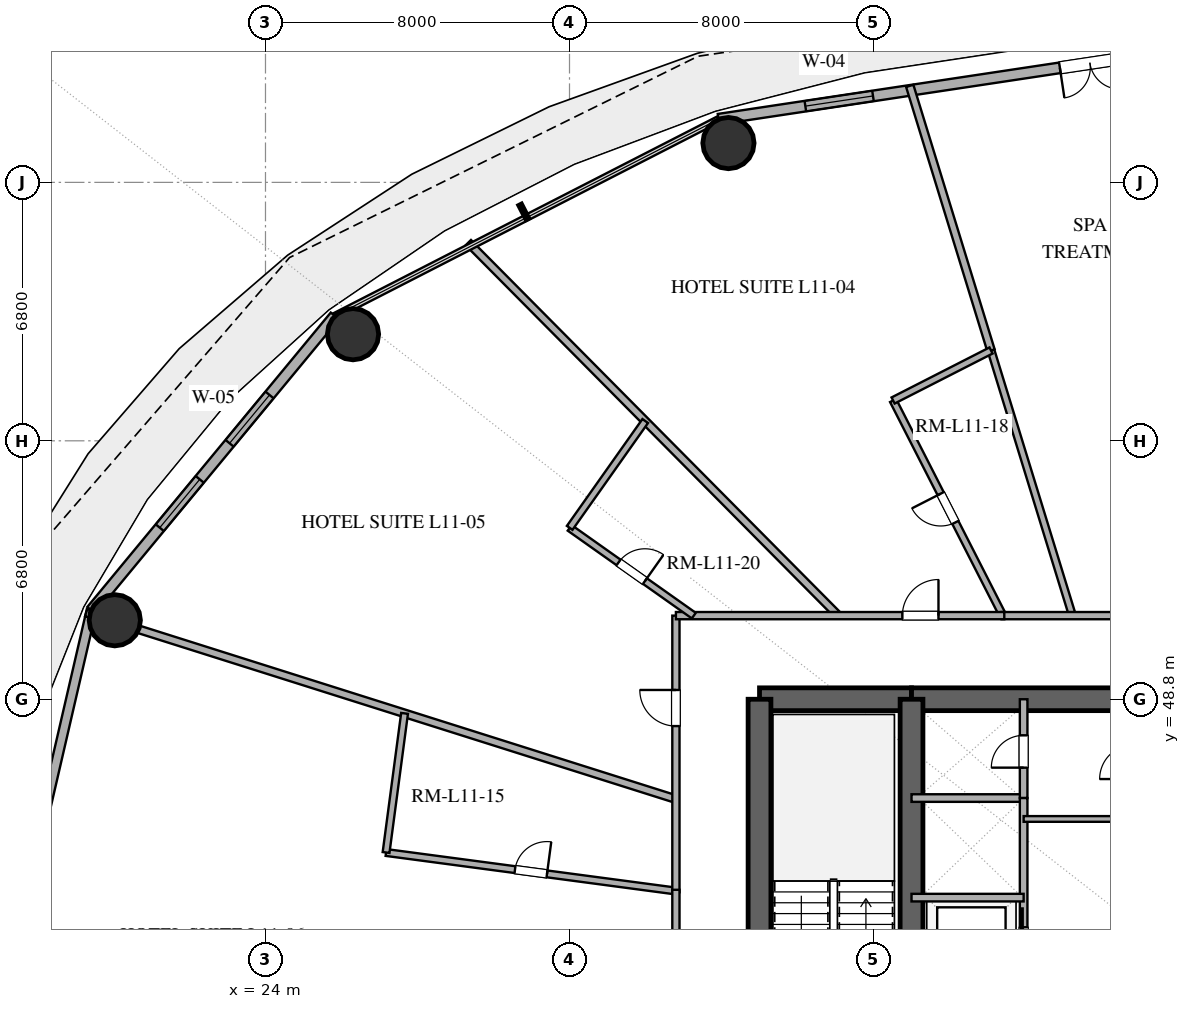
"""IFC4 building model, lengths in metres.
Left out: names, types, materials, properties, quantities, classifications, styles, units other than length and angle.
Written with IfcOpenShell. Run it as: python <this file> out.ifc"""

import sys

from ifc_helpers import new_model, si_unit, direction, frame, frame_2d, origin, origin_2d, place, context, subcontext, project, spatial, rectangle, hollow_circle, extrude, element, fill, save


model = new_model("IFC4")
c1 = context("Model", 3, precision=1e-05, world=origin(), true_north=direction((0.0, 1.0)))
c2 = subcontext(c1, "Body", "Model", "MODEL_VIEW")
j1 = project(units=[si_unit("LENGTHUNIT", "METRE"), si_unit("PLANEANGLEUNIT", "RADIAN")], contexts=[c1])
p1 = place(None, origin())
s1 = spatial("IfcSite", under=j1, at=p1, CompositionType="ELEMENT")
p2 = place(p1, origin())
s2 = spatial("IfcBuilding", under=s1, at=p2, CompositionType="ELEMENT")
p3 = place(p2, frame((0.0, 0.0, 49.8)))
s3 = spatial("IfcBuildingStorey", under=s2, at=p3, CompositionType="ELEMENT", Elevation=49.8)
p4 = place(p3, frame((37.0, 48.8, 0.0), z_axis=(0.0, 0.0, 1.0), x_axis=(1.0, 0.0, 0.0)))
e1 = element("IfcWall", 1, at=p4, inside=s3, PredefinedType="SHEAR", context=c2, shape_type="SweptSolid", body=[
    extrude(rectangle(XDim=4.0, YDim=0.6, at=frame_2d((2.0, 0.0))), origin(), (0.0, 0.0, 1.0), 3.38),
])
p5 = place(p3, frame((41.0, 48.8, 0.0), z_axis=(0.0, 0.0, 1.0), x_axis=(1.0, 0.0, 0.0)))
e2 = element("IfcWall", 2, at=p5, inside=s3, PredefinedType="SHEAR", context=c2, shape_type="SweptSolid", body=[
    extrude(rectangle(XDim=14.0, YDim=0.6, at=frame_2d((7.0, 0.0))), origin(), (0.0, 0.0, 1.0), 3.38),
])
p6 = place(p5, frame((6.1, 0.0, 0.0)))
e3 = element("IfcOpeningElement", 3, at=p6, cuts=e2, PredefinedType="OPENING", context=c2, shape_type="SweptSolid", body=[
    extrude(rectangle(XDim=1.8, YDim=2.25, at=frame_2d((0.9, 1.125))), frame((0.0, 0.31, 0.0), z_axis=(0.0, -1.0, 0.0), x_axis=(1.0, 0.0, 0.0)), (0.0, 0.0, 1.0), 0.62),
])
p7 = place(p3, frame((37.0, 35.2, 0.0), z_axis=(0.0, 0.0, 1.0), x_axis=(0.0, 1.0, 0.0)))
e4 = element("IfcWall", 4, at=p7, inside=s3, PredefinedType="SHEAR", context=c2, shape_type="SweptSolid", body=[
    extrude(rectangle(XDim=13.6, YDim=0.6, at=frame_2d((6.8, 0.0))), origin(), (0.0, 0.0, 1.0), 3.38),
])
p8 = place(p7, frame((1.5, 0.0, 0.0)))
e5 = element("IfcOpeningElement", 5, at=p8, cuts=e4, PredefinedType="OPENING", context=c2, shape_type="SweptSolid", body=[
    extrude(rectangle(XDim=1.2, YDim=2.15, at=frame_2d((0.6, 1.075))), frame((0.0, 0.31, 0.0), z_axis=(0.0, -1.0, 0.0), x_axis=(1.0, 0.0, 0.0)), (0.0, 0.0, 1.0), 0.62),
])
p9 = place(p3, frame((41.0, 35.2, 0.0), z_axis=(0.0, 0.0, 1.0), x_axis=(0.0, 1.0, 0.0)))
e6 = element("IfcWall", 6, at=p9, inside=s3, PredefinedType="SHEAR", context=c2, shape_type="SweptSolid", body=[
    extrude(rectangle(XDim=13.6, YDim=0.6, at=frame_2d((6.8, 0.0))), origin(), (0.0, 0.0, 1.0), 3.38),
])
p10 = place(p9, frame((1.15, 0.0, 0.0)))
e7 = element("IfcOpeningElement", 7, at=p10, cuts=e6, PredefinedType="OPENING", context=c2, shape_type="SweptSolid", body=[
    extrude(rectangle(XDim=1.1, YDim=2.2, at=frame_2d((0.55, 1.1))), frame((0.0, 0.31, 0.0), z_axis=(0.0, -1.0, 0.0), x_axis=(1.0, 0.0, 0.0)), (0.0, 0.0, 1.0), 0.62),
])
for number, where, z_axis, x_axis in (
    (8, (36.182, 63.434, 0.0), (0.0, 0.0, 1.0), (1.0, 0.0, 0.0)),
    (9, (26.303, 58.405, 0.0), (0.0, 0.0, 1.0), (1.0, 0.0, 0.0)),
    (10, (20.034, 50.878, 0.0), (0.0, 0.0, 1.0), (1.0, 0.0, 0.0)),
):
    element("IfcColumn", number, at=place(p3, frame(where, z_axis=z_axis, x_axis=x_axis)), inside=s3, PredefinedType="COLUMN", context=c2, shape_type="SweptSolid", body=[
        extrude(hollow_circle(Radius=0.675, WallThickness=0.036, at=origin_2d()), origin(), (0.0, 0.0, 1.0), 3.38),
    ])
p11 = place(p3, frame((48.0, 65.88, 0.0), z_axis=(0.0, 0.0, 1.0), x_axis=(-0.988864835849, -0.148816452121, 0.0)))
e11 = element("IfcWall", 11, at=p11, inside=s3, PredefinedType="SOLIDWALL", context=c2, shape_type="SweptSolid", body=[
    extrude(rectangle(XDim=12.214, YDim=0.28, at=frame_2d((6.107, 0.0))), origin(), (0.0, 0.0, 1.0), 3.38),
])
p12 = place(p11, frame((1.531, 0.0, 0.0)))
e12 = element("IfcOpeningElement", 12, at=p12, cuts=e11, PredefinedType="OPENING", context=c2, shape_type="SweptSolid", body=[
    extrude(rectangle(XDim=1.6, YDim=2.25, at=frame_2d((0.8, 1.125))), frame((0.0, 0.15, 0.0), z_axis=(0.0, -1.0, 0.0), x_axis=(1.0, 0.0, 0.0)), (0.0, 0.0, 1.0), 0.3),
])
p13 = place(p11, frame((8.104, 0.0, 0.85)))
e13 = element("IfcOpeningElement", 13, at=p13, cuts=e11, PredefinedType="OPENING", context=c2, shape_type="SweptSolid", body=[
    extrude(rectangle(XDim=1.8, YDim=2.2, at=frame_2d((0.9, 1.1))), frame((0.0, 0.15, 0.0), z_axis=(0.0, -1.0, 0.0), x_axis=(1.0, 0.0, 0.0)), (0.0, 0.0, 1.0), 0.3),
])
p14 = place(p3, frame((25.826, 58.886, 0.0), z_axis=(0.0, 0.0, 1.0), x_axis=(-0.637296809613, -0.770618437657, 0.0)))
e14 = element("IfcWall", 14, at=p14, inside=s3, PredefinedType="SOLIDWALL", context=c2, shape_type="SweptSolid", body=[
    extrude(rectangle(XDim=10.053, YDim=0.28, at=frame_2d((5.027, 0.0))), origin(), (0.0, 0.0, 1.0), 3.38),
])
p15 = place(p14, frame((2.698, 0.0, 0.85)))
e15 = element("IfcOpeningElement", 15, at=p15, cuts=e14, PredefinedType="OPENING", context=c2, shape_type="SweptSolid", body=[
    extrude(rectangle(XDim=1.65, YDim=2.0, at=frame_2d((0.825, 1.0))), frame((0.0, 0.15, 0.0), z_axis=(0.0, -1.0, 0.0), x_axis=(1.0, 0.0, 0.0)), (0.0, 0.0, 1.0), 0.3),
])
p16 = place(p14, frame((5.58, 0.0, 0.85)))
e16 = element("IfcOpeningElement", 16, at=p16, cuts=e14, PredefinedType="OPENING", context=c2, shape_type="SweptSolid", body=[
    extrude(rectangle(XDim=1.65, YDim=2.0, at=frame_2d((0.825, 1.0))), frame((0.0, 0.15, 0.0), z_axis=(0.0, -1.0, 0.0), x_axis=(1.0, 0.0, 0.0)), (0.0, 0.0, 1.0), 0.3),
])
p17 = place(p3, frame((19.419, 51.138, 0.0), z_axis=(0.0, 0.0, 1.0), x_axis=(-0.225454452941, -0.974253709076, 0.0)))
e17 = element("IfcWall", 17, at=p17, inside=s3, PredefinedType="SOLIDWALL", context=c2, shape_type="SweptSolid", body=[
    extrude(rectangle(XDim=9.38, YDim=0.25, at=frame_2d((4.69, 0.0))), origin(), (0.0, 0.0, 1.0), 3.38),
])
p18 = place(p3, frame((41.0, 46.2, 0.0), z_axis=(0.0, 0.0, 1.0), x_axis=(1.0, 0.0, 0.0)))
e18 = element("IfcWall", 18, at=p18, inside=s3, PredefinedType="SOLIDWALL", context=c2, shape_type="SweptSolid", body=[
    extrude(rectangle(XDim=2.95, YDim=0.2, at=frame_2d((1.475, 0.0))), origin(), (0.0, 0.0, 1.0), 2.74),
])
p19 = place(p3, frame((43.95, 46.2, 0.0), z_axis=(0.0, 0.0, 1.0), x_axis=(0.0, 1.0, 0.0)))
e19 = element("IfcWall", 19, at=p19, inside=s3, PredefinedType="SOLIDWALL", context=c2, shape_type="SweptSolid", body=[
    extrude(rectangle(XDim=2.6, YDim=0.2, at=frame_2d((1.3, 0.0))), origin(), (0.0, 0.0, 1.0), 2.74),
])
p20 = place(p19, frame((0.8, 0.0, 0.0)))
e20 = element("IfcOpeningElement", 20, at=p20, cuts=e19, PredefinedType="OPENING", context=c2, shape_type="SweptSolid", body=[
    extrude(rectangle(XDim=0.85, YDim=2.15, at=frame_2d((0.425, 1.075))), frame((0.0, 0.11, 0.0), z_axis=(0.0, -1.0, 0.0), x_axis=(1.0, 0.0, 0.0)), (0.0, 0.0, 1.0), 0.22),
])
p21 = place(p3, frame((43.95, 38.4, 0.0), z_axis=(0.0, 0.0, 1.0), x_axis=(0.0, 1.0, 0.0)))
e21 = element("IfcWall", 21, at=p21, inside=s3, PredefinedType="SOLIDWALL", context=c2, shape_type="SweptSolid", body=[
    extrude(rectangle(XDim=7.8, YDim=0.2, at=frame_2d((3.9, 0.0))), origin(), (0.0, 0.0, 1.0), 2.74),
])
p22 = place(p21, frame((0.7, 0.0, 0.0)))
e22 = element("IfcOpeningElement", 22, at=p22, cuts=e21, PredefinedType="OPENING", context=c2, shape_type="SweptSolid", body=[
    extrude(rectangle(XDim=1.1, YDim=2.2, at=frame_2d((0.55, 1.1))), frame((0.0, 0.11, 0.0), z_axis=(0.0, -1.0, 0.0), x_axis=(1.0, 0.0, 0.0)), (0.0, 0.0, 1.0), 0.22),
])
p23 = place(p21, frame((3.3, 0.0, 0.0)))
e23 = element("IfcOpeningElement", 23, at=p23, cuts=e21, PredefinedType="OPENING", context=c2, shape_type="SweptSolid", body=[
    extrude(rectangle(XDim=1.1, YDim=2.2, at=frame_2d((0.55, 1.1))), frame((0.0, 0.11, 0.0), z_axis=(0.0, -1.0, 0.0), x_axis=(1.0, 0.0, 0.0)), (0.0, 0.0, 1.0), 0.22),
])
p24 = place(p3, frame((41.0, 43.58, 0.0), z_axis=(0.0, 0.0, 1.0), x_axis=(1.0, 0.0, 0.0)))
e24 = element("IfcWall", 24, at=p24, inside=s3, PredefinedType="SOLIDWALL", context=c2, shape_type="SweptSolid", body=[
    extrude(rectangle(XDim=2.95, YDim=0.2, at=frame_2d((1.475, 0.0))), origin(), (0.0, 0.0, 1.0), 2.74),
])
p25 = place(p3, frame((43.95, 45.65, 0.0), z_axis=(0.0, 0.0, 1.0), x_axis=(1.0, 0.0, 0.0)))
e25 = element("IfcWall", 25, at=p25, inside=s3, PredefinedType="PARTITIONING", context=c2, shape_type="SweptSolid", body=[
    extrude(rectangle(XDim=2.9, YDim=0.15, at=frame_2d((1.45, 0.0))), origin(), (0.0, 0.0, 1.0), 2.74),
])
p26 = place(p3, frame((34.8, 46.172, 0.0), z_axis=(0.0, 0.0, 1.0), x_axis=(-0.953511676516, 0.301356073023, 0.0)))
e26 = element("IfcWall", 26, at=p26, inside=s3, PredefinedType="PARTITIONING", context=c2, shape_type="SweptSolid", body=[
    extrude(rectangle(XDim=16.275, YDim=0.2, at=frame_2d((8.137, 0.0))), origin(), (0.0, 0.0, 1.0), 2.74),
])
p27 = place(p3, frame((27.173, 44.768, 0.0), z_axis=(0.0, 0.0, 1.0), x_axis=(0.991283239225, -0.131748015661, 0.0)))
e27 = element("IfcWall", 27, at=p27, inside=s3, PredefinedType="PLUMBINGWALL", context=c2, shape_type="SweptSolid", body=[
    extrude(rectangle(XDim=7.694, YDim=0.18, at=frame_2d((3.847, 0.0))), origin(), (0.0, 0.0, 1.0), 2.74),
])
p28 = place(p27, frame((3.422, 0.0, 0.0)))
e28 = element("IfcOpeningElement", 28, at=p28, cuts=e27, PredefinedType="OPENING", context=c2, shape_type="SweptSolid", body=[
    extrude(rectangle(XDim=0.85, YDim=2.1, at=frame_2d((0.425, 1.05))), frame((0.0, 0.1, 0.0), z_axis=(0.0, -1.0, 0.0), x_axis=(1.0, 0.0, 0.0)), (0.0, 0.0, 1.0), 0.2),
])
p29 = place(p3, frame((43.092, 57.976, 0.0), z_axis=(0.0, 0.0, 1.0), x_axis=(0.293648581073, -0.95591344317, 0.0)))
e29 = element("IfcWall", 29, at=p29, inside=s3, PredefinedType="PLUMBINGWALL", context=c2, shape_type="SweptSolid", body=[
    extrude(rectangle(XDim=7.298, YDim=0.18, at=frame_2d((3.649, 0.0))), origin(), (0.0, 0.0, 1.0), 2.74),
])
p30 = place(p3, frame((40.953, 64.939, 0.0), z_axis=(0.0, 0.0, 1.0), x_axis=(0.293635973675, -0.955917315966, 0.0)))
e30 = element("IfcWall", 30, at=p30, inside=s3, PredefinedType="PARTITIONING", context=c2, shape_type="SweptSolid", body=[
    extrude(rectangle(XDim=7.284, YDim=0.2, at=frame_2d((3.642, 0.0))), origin(), (0.0, 0.0, 1.0), 2.74),
])
p31 = place(p3, frame((39.072, 51.0, 0.0), z_axis=(0.0, 0.0, 1.0), x_axis=(-0.704257683765, 0.70994444491, 0.0)))
e31 = element("IfcWall", 31, at=p31, inside=s3, PredefinedType="PARTITIONING", context=c2, shape_type="SweptSolid", body=[
    extrude(rectangle(XDim=13.824, YDim=0.2, at=frame_2d((6.912, 0.0))), origin(), (0.0, 0.0, 1.0), 2.74),
])
p32 = place(p3, frame((43.405, 51.0, 0.0), z_axis=(0.0, 0.0, 1.0), x_axis=(-0.454680565764, 0.890654581259, 0.0)))
e32 = element("IfcWall", 32, at=p32, inside=s3, PredefinedType="PLUMBINGWALL", context=c2, shape_type="SweptSolid", body=[
    extrude(rectangle(XDim=6.356, YDim=0.18, at=frame_2d((3.178, 0.0))), origin(), (0.0, 0.0, 1.0), 2.74),
])
p33 = place(p32, frame((2.753, 0.0, 0.0)))
e33 = element("IfcOpeningElement", 33, at=p33, cuts=e32, PredefinedType="OPENING", context=c2, shape_type="SweptSolid", body=[
    extrude(rectangle(XDim=0.85, YDim=2.1, at=frame_2d((0.425, 1.05))), frame((0.0, 0.1, 0.0), z_axis=(0.0, -1.0, 0.0), x_axis=(1.0, 0.0, 0.0)), (0.0, 0.0, 1.0), 0.2),
])
p34 = place(p3, frame((43.369, 51.0, 0.0), z_axis=(0.0, 0.0, 1.0), x_axis=(1.0, 0.0, 0.0)))
e34 = element("IfcWall", 34, at=p34, inside=s3, PredefinedType="PARTITIONING", context=c2, shape_type="SweptSolid", body=[
    extrude(rectangle(XDim=17.831, YDim=0.19, at=frame_2d((8.916, 0.0))), origin(), (0.0, 0.0, 1.0), 2.74),
])
p35 = place(p34, frame((14.29, 0.0, 0.0)))
e35 = element("IfcOpeningElement", 35, at=p35, cuts=e34, PredefinedType="OPENING", context=c2, shape_type="SweptSolid", body=[
    extrude(rectangle(XDim=0.95, YDim=2.15, at=frame_2d((0.475, 1.075))), frame((0.0, 0.105, 0.0), z_axis=(0.0, -1.0, 0.0), x_axis=(1.0, 0.0, 0.0)), (0.0, 0.0, 1.0), 0.21),
])
p36 = place(p34, frame((8.533, 0.0, 0.0)))
e36 = element("IfcOpeningElement", 36, at=p36, cuts=e34, PredefinedType="OPENING", context=c2, shape_type="SweptSolid", body=[
    extrude(rectangle(XDim=1.0, YDim=2.2, at=frame_2d((0.5, 1.1))), frame((0.0, 0.105, 0.0), z_axis=(0.0, -1.0, 0.0), x_axis=(1.0, 0.0, 0.0)), (0.0, 0.0, 1.0), 0.21),
])
p37 = place(p34, frame((3.591, 0.0, 0.0)))
e37 = element("IfcOpeningElement", 37, at=p37, cuts=e34, PredefinedType="OPENING", context=c2, shape_type="SweptSolid", body=[
    extrude(rectangle(XDim=1.0, YDim=2.2, at=frame_2d((0.5, 1.1))), frame((0.0, 0.105, 0.0), z_axis=(0.0, -1.0, 0.0), x_axis=(1.0, 0.0, 0.0)), (0.0, 0.0, 1.0), 0.21),
])
p38 = place(p3, frame((34.8, 43.722, 0.0), z_axis=(0.0, 0.0, 1.0), x_axis=(0.0, 1.0, 0.0)))
e38 = element("IfcWall", 38, at=p38, inside=s3, PredefinedType="PARTITIONING", context=c2, shape_type="SweptSolid", body=[
    extrude(rectangle(XDim=7.278, YDim=0.19, at=frame_2d((3.639, 0.0))), origin(), (0.0, 0.0, 1.0), 2.74),
])
p39 = place(p38, frame((4.372, 0.0, 0.0)))
e39 = element("IfcOpeningElement", 39, at=p39, cuts=e38, PredefinedType="OPENING", context=c2, shape_type="SweptSolid", body=[
    extrude(rectangle(XDim=0.95, YDim=2.15, at=frame_2d((0.475, 1.075))), frame((0.0, 0.105, 0.0), z_axis=(0.0, -1.0, 0.0), x_axis=(1.0, 0.0, 0.0)), (0.0, 0.0, 1.0), 0.21),
])
p40 = place(p3, frame((34.8, 51.0, 0.0), z_axis=(0.0, 0.0, 1.0), x_axis=(1.0, 0.0, 0.0)))
e40 = element("IfcWall", 40, at=p40, inside=s3, PredefinedType="PARTITIONING", context=c2, shape_type="SweptSolid", body=[
    extrude(rectangle(XDim=8.641, YDim=0.19, at=frame_2d((4.32, 0.0))), origin(), (0.0, 0.0, 1.0), 2.74),
])
p41 = place(p40, frame((5.959, 0.0, 0.0)))
e41 = element("IfcOpeningElement", 41, at=p41, cuts=e40, PredefinedType="OPENING", context=c2, shape_type="SweptSolid", body=[
    extrude(rectangle(XDim=0.95, YDim=2.15, at=frame_2d((0.475, 1.075))), frame((0.0, 0.105, 0.0), z_axis=(0.0, -1.0, 0.0), x_axis=(1.0, 0.0, 0.0)), (0.0, 0.0, 1.0), 0.21),
])
p42 = place(p3, frame((34.8, 39.604, 0.0), z_axis=(0.0, 0.0, 1.0), x_axis=(0.0, 1.0, 0.0)))
e42 = element("IfcWall", 42, at=p42, inside=s3, PredefinedType="PARTITIONING", context=c2, shape_type="SweptSolid", body=[
    extrude(rectangle(XDim=4.183, YDim=0.19, at=frame_2d((2.091, 0.0))), origin(), (0.0, 0.0, 1.0), 2.74),
])
p43 = place(p42, frame((1.616, 0.0, 0.0)))
e43 = element("IfcOpeningElement", 43, at=p43, cuts=e42, PredefinedType="OPENING", context=c2, shape_type="SweptSolid", body=[
    extrude(rectangle(XDim=0.95, YDim=2.15, at=frame_2d((0.475, 1.075))), frame((0.0, 0.105, 0.0), z_axis=(0.0, -1.0, 0.0), x_axis=(1.0, 0.0, 0.0)), (0.0, 0.0, 1.0), 0.21),
])
p44 = place(p3, frame((32.005, 53.309, 0.0), z_axis=(0.0, 0.0, 1.0), x_axis=(0.816524416543, -0.577310901672, 0.0)))
e44 = element("IfcWall", 44, at=p44, inside=s3, PredefinedType="PLUMBINGWALL", context=c2, shape_type="SweptSolid", body=[
    extrude(rectangle(XDim=4.0, YDim=0.18, at=frame_2d((2.0, 0.0))), origin(), (0.0, 0.0, 1.0), 2.74),
])
p45 = place(p44, frame((1.575, 0.0, 0.0)))
e45 = element("IfcOpeningElement", 45, at=p45, cuts=e44, PredefinedType="OPENING", context=c2, shape_type="SweptSolid", body=[
    extrude(rectangle(XDim=0.85, YDim=2.1, at=frame_2d((0.425, 1.05))), frame((0.0, 0.1, 0.0), z_axis=(0.0, -1.0, 0.0), x_axis=(1.0, 0.0, 0.0)), (0.0, 0.0, 1.0), 0.2),
])
p46 = place(p3, frame((27.66, 48.428, 0.0), z_axis=(0.0, 0.0, 1.0), x_axis=(-0.131760975246, -0.991281516726, 0.0)))
e46 = element("IfcWall", 46, at=p46, inside=s3, PredefinedType="PLUMBINGWALL", context=c2, shape_type="SweptSolid", body=[
    extrude(rectangle(XDim=3.693, YDim=0.18, at=frame_2d((1.846, 0.0))), origin(), (0.0, 0.0, 1.0), 2.74),
])
p47 = place(p3, frame((33.993, 56.121, 0.0), z_axis=(0.0, 0.0, 1.0), x_axis=(-0.57730102799, -0.816531397487, 0.0)))
e47 = element("IfcWall", 47, at=p47, inside=s3, PredefinedType="PLUMBINGWALL", context=c2, shape_type="SweptSolid", body=[
    extrude(rectangle(XDim=3.443, YDim=0.18, at=frame_2d((1.722, 0.0))), origin(), (0.0, 0.0, 1.0), 2.74),
])
p48 = place(p3, frame((40.515, 56.661, 0.0), z_axis=(0.0, 0.0, 1.0), x_axis=(0.890666340124, 0.454657531083, 0.0)))
e48 = element("IfcWall", 48, at=p48, inside=s3, PredefinedType="PLUMBINGWALL", context=c2, shape_type="SweptSolid", body=[
    extrude(rectangle(XDim=2.893, YDim=0.18, at=frame_2d((1.447, 0.0))), origin(), (0.0, 0.0, 1.0), 2.74),
])
p49 = place(p12, origin())
e49 = element("IfcDoor", 49, at=p49, inside=s3, OperationType="DOUBLE_DOOR_SINGLE_SWING", PredefinedType="DOOR", context=c2, shape_type="SweptSolid", body=[
    extrude(rectangle(XDim=1.6, YDim=2.25, at=frame_2d((0.8, 1.125))), frame((0.0, 0.025, 0.0), z_axis=(0.0, -1.0, 0.0), x_axis=(1.0, 0.0, 0.0)), (0.0, 0.0, 1.0), 0.05),
])
fill(e12, e49)
p50 = place(p13, origin())
e50 = element("IfcWindow", 50, at=p50, inside=s3, PartitioningType="SINGLE_PANEL", PredefinedType="WINDOW", context=c2, shape_type="SweptSolid", body=[
    extrude(rectangle(XDim=1.8, YDim=2.2, at=frame_2d((0.9, 1.1))), frame((0.0, 0.03, 0.0), z_axis=(0.0, -1.0, 0.0), x_axis=(1.0, 0.0, 0.0)), (0.0, 0.0, 1.0), 0.06),
])
fill(e13, e50)
p51 = place(p15, origin())
e51 = element("IfcWindow", 51, at=p51, inside=s3, PartitioningType="SINGLE_PANEL", PredefinedType="WINDOW", context=c2, shape_type="SweptSolid", body=[
    extrude(rectangle(XDim=1.65, YDim=2.0, at=frame_2d((0.825, 1.0))), frame((0.0, 0.03, 0.0), z_axis=(0.0, -1.0, 0.0), x_axis=(1.0, 0.0, 0.0)), (0.0, 0.0, 1.0), 0.06),
])
fill(e15, e51)
p52 = place(p16, origin())
e52 = element("IfcWindow", 52, at=p52, inside=s3, PartitioningType="SINGLE_PANEL", PredefinedType="WINDOW", context=c2, shape_type="SweptSolid", body=[
    extrude(rectangle(XDim=1.65, YDim=2.0, at=frame_2d((0.825, 1.0))), frame((0.0, 0.03, 0.0), z_axis=(0.0, -1.0, 0.0), x_axis=(1.0, 0.0, 0.0)), (0.0, 0.0, 1.0), 0.06),
])
fill(e16, e52)
p53 = place(p20, origin())
e53 = element("IfcDoor", 53, at=p53, inside=s3, OperationType="SINGLE_SWING_LEFT", PredefinedType="DOOR", context=c2, shape_type="SweptSolid", body=[
    extrude(rectangle(XDim=0.85, YDim=2.15, at=frame_2d((0.425, 1.075))), frame((0.0, 0.025, 0.0), z_axis=(0.0, -1.0, 0.0), x_axis=(1.0, 0.0, 0.0)), (0.0, 0.0, 1.0), 0.05),
])
fill(e20, e53)
p54 = place(p23, origin())
e54 = element("IfcDoor", 54, at=p54, inside=s3, OperationType="SLIDING_TO_RIGHT", PredefinedType="DOOR", context=c2, shape_type="SweptSolid", body=[
    extrude(rectangle(XDim=1.1, YDim=2.2, at=frame_2d((0.55, 1.1))), frame((0.0, 0.025, 0.0), z_axis=(0.0, -1.0, 0.0), x_axis=(1.0, 0.0, 0.0)), (0.0, 0.0, 1.0), 0.05),
])
fill(e23, e54)
p55 = place(p28, origin())
e55 = element("IfcDoor", 55, at=p55, inside=s3, OperationType="SINGLE_SWING_RIGHT", PredefinedType="DOOR", context=c2, shape_type="SweptSolid", body=[
    extrude(rectangle(XDim=0.85, YDim=2.1, at=frame_2d((0.425, 1.05))), frame((0.0, 0.025, 0.0), z_axis=(0.0, -1.0, 0.0), x_axis=(1.0, 0.0, 0.0)), (0.0, 0.0, 1.0), 0.05),
])
fill(e28, e55)
p56 = place(p33, origin())
e56 = element("IfcDoor", 56, at=p56, inside=s3, OperationType="SINGLE_SWING_RIGHT", PredefinedType="DOOR", context=c2, shape_type="SweptSolid", body=[
    extrude(rectangle(XDim=0.85, YDim=2.1, at=frame_2d((0.425, 1.05))), frame((0.0, 0.025, 0.0), z_axis=(0.0, -1.0, 0.0), x_axis=(1.0, 0.0, 0.0)), (0.0, 0.0, 1.0), 0.05),
])
fill(e33, e56)
p57 = place(p39, origin())
e57 = element("IfcDoor", 57, at=p57, inside=s3, OperationType="SINGLE_SWING_RIGHT", PredefinedType="DOOR", context=c2, shape_type="SweptSolid", body=[
    extrude(rectangle(XDim=0.95, YDim=2.15, at=frame_2d((0.475, 1.075))), frame((0.0, 0.025, 0.0), z_axis=(0.0, -1.0, 0.0), x_axis=(1.0, 0.0, 0.0)), (0.0, 0.0, 1.0), 0.05),
])
fill(e39, e57)
p58 = place(p41, origin())
e58 = element("IfcDoor", 58, at=p58, inside=s3, OperationType="SINGLE_SWING_RIGHT", PredefinedType="DOOR", context=c2, shape_type="SweptSolid", body=[
    extrude(rectangle(XDim=0.95, YDim=2.15, at=frame_2d((0.475, 1.075))), frame((0.0, 0.025, 0.0), z_axis=(0.0, -1.0, 0.0), x_axis=(1.0, 0.0, 0.0)), (0.0, 0.0, 1.0), 0.05),
])
fill(e41, e58)
p59 = place(p45, origin())
e59 = element("IfcDoor", 59, at=p59, inside=s3, OperationType="SINGLE_SWING_RIGHT", PredefinedType="DOOR", context=c2, shape_type="SweptSolid", body=[
    extrude(rectangle(XDim=0.85, YDim=2.1, at=frame_2d((0.425, 1.05))), frame((0.0, 0.025, 0.0), z_axis=(0.0, -1.0, 0.0), x_axis=(1.0, 0.0, 0.0)), (0.0, 0.0, 1.0), 0.05),
])
fill(e45, e59)
save(model, sys.argv[1])
